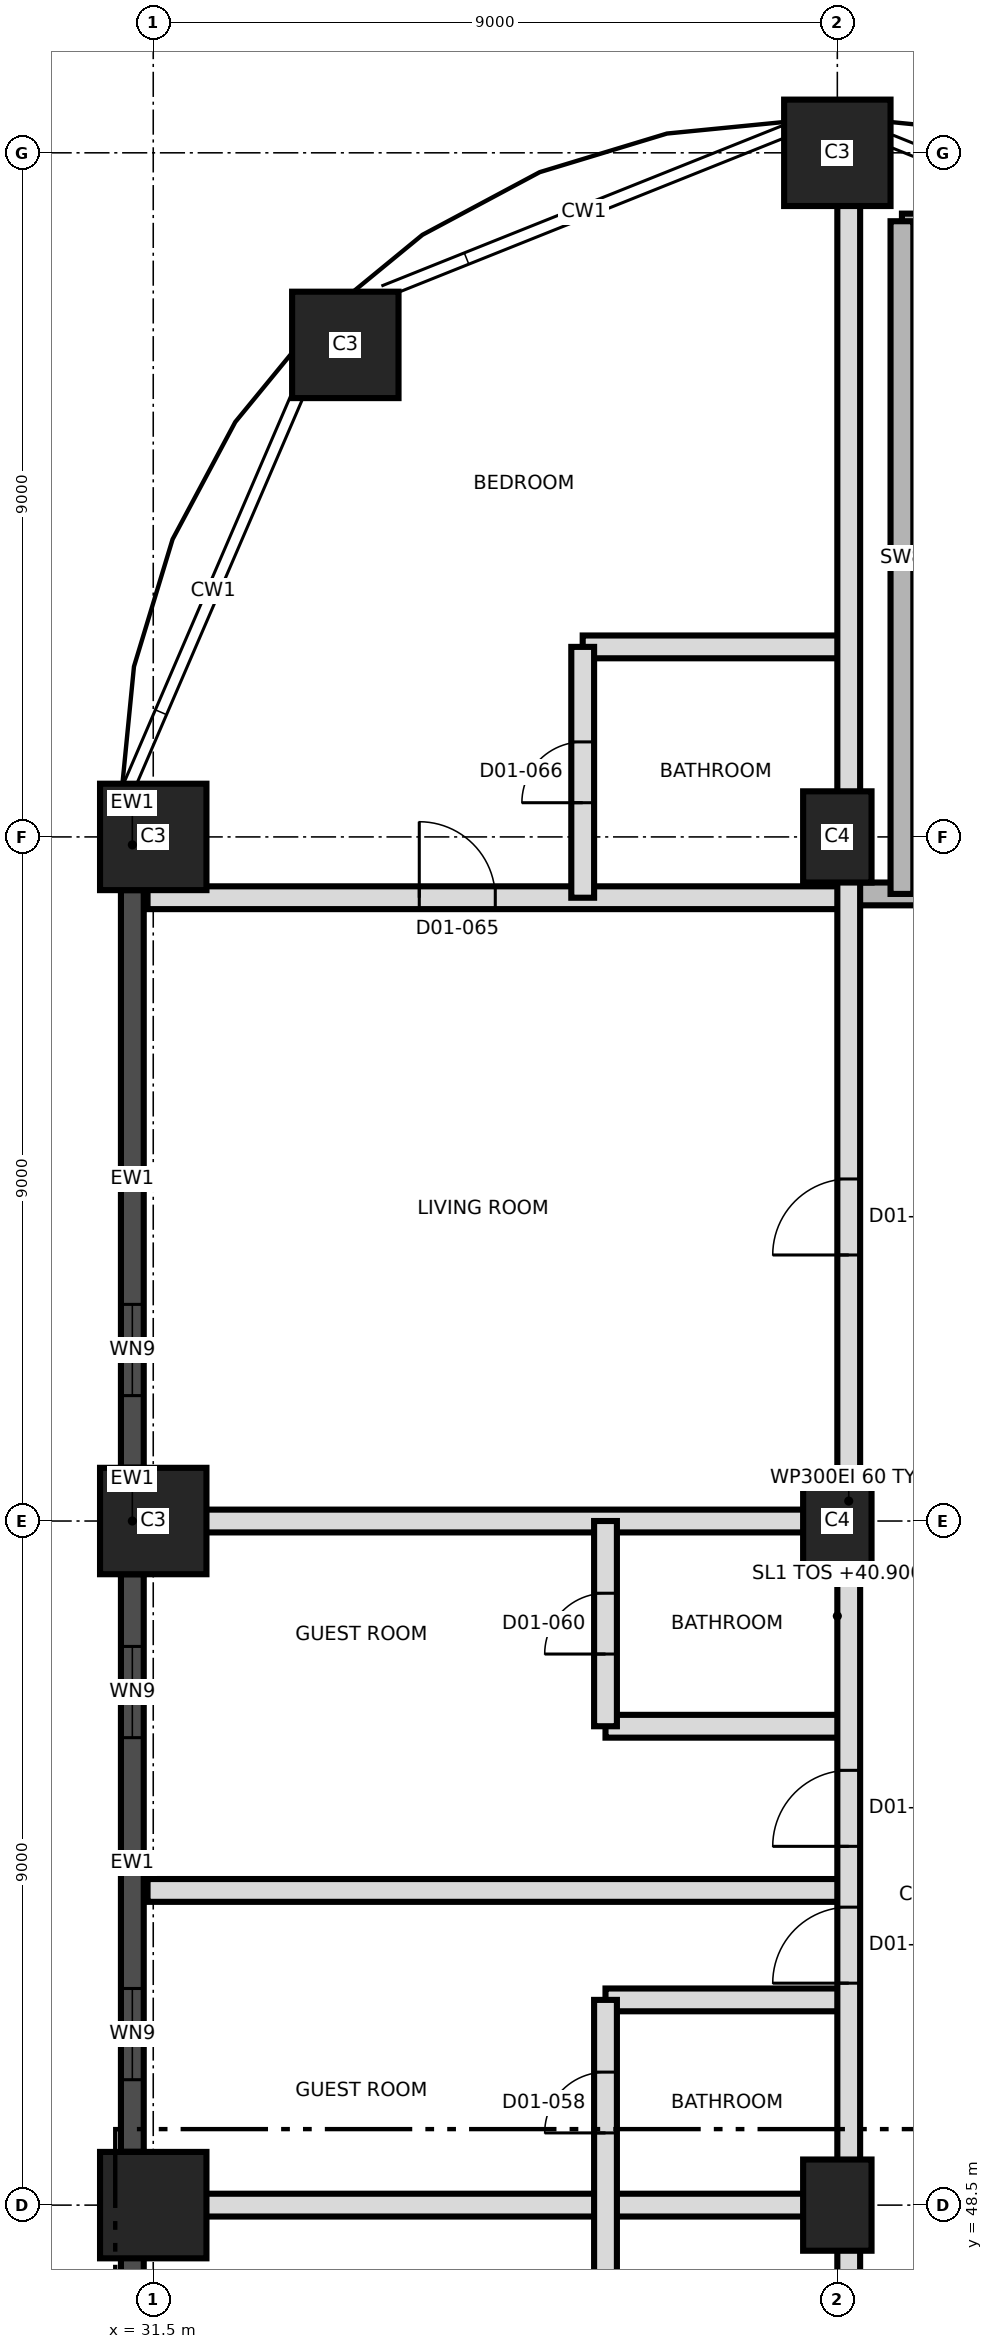
"""IFC4 building model, lengths in metres.
Left out: names, types, materials, properties, quantities, classifications, styles, units other than length and angle.
Written with IfcOpenShell. Run it as: python <this file> out.ifc"""

import sys

from ifc_helpers import new_model, si_unit, direction, frame, frame_2d, origin, origin_2d, place, context, subcontext, project, spatial, rectangle, extrude, element, fill, save


model = new_model("IFC4")
c1 = context("Model", 3, precision=1e-05, world=origin(), true_north=direction((0.0, 1.0)))
c2 = subcontext(c1, "Body", "Model", "MODEL_VIEW")
j1 = project(units=[si_unit("LENGTHUNIT", "METRE"), si_unit("PLANEANGLEUNIT", "RADIAN")], contexts=[c1])
p1 = place(None, origin())
s1 = spatial("IfcSite", under=j1, at=p1, CompositionType="ELEMENT")
p2 = place(p1, origin())
s2 = spatial("IfcBuilding", under=s1, at=p2, CompositionType="ELEMENT")
p3 = place(p2, frame((0.0, 0.0, 40.9)))
s3 = spatial("IfcBuildingStorey", under=s2, at=p3, CompositionType="ELEMENT", Elevation=40.9)
p4 = place(p3, frame((31.5, 48.5, 0.0), z_axis=(0.0, 0.0, 1.0), x_axis=(1.0, 0.0, 0.0)))
e1 = element("IfcColumn", 1, at=p4, inside=s3, PredefinedType="COLUMN", context=c2, shape_type="SweptSolid", body=[
    extrude(rectangle(XDim=1.4, YDim=1.4, at=origin_2d()), origin(), (0.0, 0.0, 1.0), 3.7),
])
p5 = place(p3, frame((40.5, 48.5, 0.0), z_axis=(0.0, 0.0, 1.0), x_axis=(0.0, 1.0, 0.0)))
e2 = element("IfcColumn", 2, at=p5, inside=s3, PredefinedType="COLUMN", context=c2, shape_type="SweptSolid", body=[
    extrude(rectangle(XDim=1.2, YDim=0.9, at=origin_2d()), origin(), (0.0, 0.0, 1.0), 3.7),
])
p6 = place(p3, frame((31.5, 57.5, 0.0), z_axis=(0.0, 0.0, 1.0), x_axis=(1.0, 0.0, 0.0)))
e3 = element("IfcColumn", 3, at=p6, inside=s3, PredefinedType="COLUMN", context=c2, shape_type="SweptSolid", body=[
    extrude(rectangle(XDim=1.4, YDim=1.4, at=origin_2d()), origin(), (0.0, 0.0, 1.0), 3.7),
])
p7 = place(p3, frame((40.5, 57.5, 0.0), z_axis=(0.0, 0.0, 1.0), x_axis=(0.0, 1.0, 0.0)))
e4 = element("IfcColumn", 4, at=p7, inside=s3, PredefinedType="COLUMN", context=c2, shape_type="SweptSolid", body=[
    extrude(rectangle(XDim=1.2, YDim=0.9, at=origin_2d()), origin(), (0.0, 0.0, 1.0), 3.7),
])
p8 = place(p3, frame((31.5, 66.5, 0.0), z_axis=(0.0, 0.0, 1.0), x_axis=(1.0, 0.0, 0.0)))
e5 = element("IfcColumn", 5, at=p8, inside=s3, PredefinedType="COLUMN", context=c2, shape_type="SweptSolid", body=[
    extrude(rectangle(XDim=1.4, YDim=1.4, at=origin_2d()), origin(), (0.0, 0.0, 1.0), 3.7),
])
p9 = place(p3, frame((40.5, 66.5, 0.0), z_axis=(0.0, 0.0, 1.0), x_axis=(0.0, 1.0, 0.0)))
e6 = element("IfcColumn", 6, at=p9, inside=s3, PredefinedType="COLUMN", context=c2, shape_type="SweptSolid", body=[
    extrude(rectangle(XDim=1.2, YDim=0.9, at=origin_2d()), origin(), (0.0, 0.0, 1.0), 3.7),
])
for number, where, z_axis, x_axis in (
    (7, (34.027, 72.973, 0.0), (0.0, 0.0, 1.0), (1.0, 0.0, 0.0)),
    (8, (40.5, 75.5, 0.0), (0.0, 0.0, 1.0), (1.0, 0.0, 0.0)),
):
    element("IfcColumn", number, at=place(p3, frame(where, z_axis=z_axis, x_axis=x_axis)), inside=s3, PredefinedType="COLUMN", context=c2, shape_type="SweptSolid", body=[
        extrude(rectangle(XDim=1.4, YDim=1.4, at=origin_2d()), origin(), (0.0, 0.0, 1.0), 3.7),
    ])
p10 = place(p3, frame((31.225, 66.992, 0.0), z_axis=(0.0, 0.0, 1.0), x_axis=(0.0, -1.0, 0.0)))
e9 = element("IfcWall", 9, at=p10, inside=s3, PredefinedType="SOLIDWALL", context=c2, shape_type="SweptSolid", body=[
    extrude(rectangle(XDim=1.192, YDim=0.3, at=frame_2d((0.596, 0.0))), origin(), (0.0, 0.0, 1.0), 3.4),
])
p11 = place(p3, frame((31.225, 65.8, 0.0), z_axis=(0.0, 0.0, 1.0), x_axis=(0.0, -1.0, 0.0)))
e10 = element("IfcWall", 10, at=p11, inside=s3, PredefinedType="SOLIDWALL", context=c2, shape_type="SweptSolid", body=[
    extrude(rectangle(XDim=7.6, YDim=0.3, at=frame_2d((3.8, 0.0))), origin(), (0.0, 0.0, 1.0), 2.7),
])
p12 = place(p11, frame((5.45, 0.0, 0.9)))
e11 = element("IfcOpeningElement", 11, at=p12, cuts=e10, PredefinedType="OPENING", context=c2, shape_type="SweptSolid", body=[
    extrude(rectangle(XDim=1.2, YDim=1.5, at=frame_2d((0.6, 0.75))), frame((0.0, 0.16, 0.0), z_axis=(0.0, -1.0, 0.0), x_axis=(1.0, 0.0, 0.0)), (0.0, 0.0, 1.0), 0.32),
])
p13 = place(p3, frame((31.225, 58.2, 0.0), z_axis=(0.0, 0.0, 1.0), x_axis=(0.0, -1.0, 0.0)))
e12 = element("IfcWall", 12, at=p13, inside=s3, PredefinedType="SOLIDWALL", context=c2, shape_type="SweptSolid", body=[
    extrude(rectangle(XDim=1.4, YDim=0.3, at=frame_2d((0.7, 0.0))), origin(), (0.0, 0.0, 1.0), 3.4),
])
p14 = place(p3, frame((31.225, 56.8, 0.0), z_axis=(0.0, 0.0, 1.0), x_axis=(0.0, -1.0, 0.0)))
e13 = element("IfcWall", 13, at=p14, inside=s3, PredefinedType="SOLIDWALL", context=c2, shape_type="SweptSolid", body=[
    extrude(rectangle(XDim=7.6, YDim=0.3, at=frame_2d((3.8, 0.0))), origin(), (0.0, 0.0, 1.0), 2.7),
])
p15 = place(p14, frame((0.95, 0.0, 0.9)))
e14 = element("IfcOpeningElement", 14, at=p15, cuts=e13, PredefinedType="OPENING", context=c2, shape_type="SweptSolid", body=[
    extrude(rectangle(XDim=1.2, YDim=1.5, at=frame_2d((0.6, 0.75))), frame((0.0, 0.16, 0.0), z_axis=(0.0, -1.0, 0.0), x_axis=(1.0, 0.0, 0.0)), (0.0, 0.0, 1.0), 0.32),
])
p16 = place(p14, frame((5.45, 0.0, 0.9)))
e15 = element("IfcOpeningElement", 15, at=p16, cuts=e13, PredefinedType="OPENING", context=c2, shape_type="SweptSolid", body=[
    extrude(rectangle(XDim=1.2, YDim=1.5, at=frame_2d((0.6, 0.75))), frame((0.0, 0.16, 0.0), z_axis=(0.0, -1.0, 0.0), x_axis=(1.0, 0.0, 0.0)), (0.0, 0.0, 1.0), 0.32),
])
p17 = place(p3, frame((31.225, 49.2, 0.0), z_axis=(0.0, 0.0, 1.0), x_axis=(0.0, -1.0, 0.0)))
e16 = element("IfcWall", 16, at=p17, inside=s3, PredefinedType="SOLIDWALL", context=c2, shape_type="SweptSolid", body=[
    extrude(rectangle(XDim=9.02, YDim=0.3, at=frame_2d((4.51, 0.0))), origin(), (0.0, 0.0, 1.0), 3.4),
])
p18 = place(p17, frame((2.35, 0.0, 0.9)))
e17 = element("IfcOpeningElement", 17, at=p18, cuts=e16, PredefinedType="OPENING", context=c2, shape_type="SweptSolid", body=[
    extrude(rectangle(XDim=1.2, YDim=1.5, at=frame_2d((0.6, 0.75))), frame((0.0, 0.16, 0.0), z_axis=(0.0, -1.0, 0.0), x_axis=(1.0, 0.0, 0.0)), (0.0, 0.0, 1.0), 0.32),
])
p19 = place(p17, frame((6.21, 0.0, 0.3)))
e18 = element("IfcOpeningElement", 18, at=p19, cuts=e16, PredefinedType="OPENING", context=c2, shape_type="SweptSolid", body=[
    extrude(rectangle(XDim=1.8, YDim=2.4, at=frame_2d((0.9, 1.2))), frame((0.0, 0.16, 0.0), z_axis=(0.0, -1.0, 0.0), x_axis=(1.0, 0.0, 0.0)), (0.0, 0.0, 1.0), 0.32),
])
p20 = place(p3, frame((31.425, 48.5, 0.0), z_axis=(0.0, 0.0, 1.0), x_axis=(1.0, 0.0, 0.0)))
e19 = element("IfcWall", 19, at=p20, inside=s3, PredefinedType="PARTITIONING", context=c2, shape_type="SweptSolid", body=[
    extrude(rectangle(XDim=9.225, YDim=0.3, at=frame_2d((4.612, 0.0))), origin(), (0.0, 0.0, 1.0), 3.4),
])
p21 = place(p3, frame((37.45, 51.2, 0.0), z_axis=(0.0, 0.0, 1.0), x_axis=(1.0, 0.0, 0.0)))
e20 = element("IfcWall", 20, at=p21, inside=s3, PredefinedType="PARTITIONING", context=c2, shape_type="SweptSolid", body=[
    extrude(rectangle(XDim=3.2, YDim=0.3, at=frame_2d((1.6, 0.0))), origin(), (0.0, 0.0, 1.0), 3.4),
])
p22 = place(p3, frame((31.425, 52.64, 0.0), z_axis=(0.0, 0.0, 1.0), x_axis=(1.0, 0.0, 0.0)))
e21 = element("IfcWall", 21, at=p22, inside=s3, PredefinedType="PARTITIONING", context=c2, shape_type="SweptSolid", body=[
    extrude(rectangle(XDim=9.225, YDim=0.3, at=frame_2d((4.612, 0.0))), origin(), (0.0, 0.0, 1.0), 3.4),
])
p23 = place(p3, frame((37.45, 54.8, 0.0), z_axis=(0.0, 0.0, 1.0), x_axis=(1.0, 0.0, 0.0)))
e22 = element("IfcWall", 22, at=p23, inside=s3, PredefinedType="PARTITIONING", context=c2, shape_type="SweptSolid", body=[
    extrude(rectangle(XDim=3.2, YDim=0.3, at=frame_2d((1.6, 0.0))), origin(), (0.0, 0.0, 1.0), 3.4),
])
p24 = place(p3, frame((31.425, 57.5, 0.0), z_axis=(0.0, 0.0, 1.0), x_axis=(1.0, 0.0, 0.0)))
e23 = element("IfcWall", 23, at=p24, inside=s3, PredefinedType="PARTITIONING", context=c2, shape_type="SweptSolid", body=[
    extrude(rectangle(XDim=9.225, YDim=0.3, at=frame_2d((4.612, 0.0))), origin(), (0.0, 0.0, 1.0), 3.4),
])
p25 = place(p3, frame((31.425, 65.7, 0.0), z_axis=(0.0, 0.0, 1.0), x_axis=(1.0, 0.0, 0.0)))
e24 = element("IfcWall", 24, at=p25, inside=s3, PredefinedType="PARTITIONING", context=c2, shape_type="SweptSolid", body=[
    extrude(rectangle(XDim=9.225, YDim=0.3, at=frame_2d((4.612, 0.0))), origin(), (0.0, 0.0, 1.0), 3.4),
])
p26 = place(p25, frame((3.575, 0.0, 0.0)))
e25 = element("IfcOpeningElement", 25, at=p26, cuts=e24, PredefinedType="OPENING", context=c2, shape_type="SweptSolid", body=[
    extrude(rectangle(XDim=1.0, YDim=2.1, at=frame_2d((0.5, 1.05))), frame((0.0, 0.16, 0.0), z_axis=(0.0, -1.0, 0.0), x_axis=(1.0, 0.0, 0.0)), (0.0, 0.0, 1.0), 0.32),
])
p27 = place(p3, frame((40.65, 65.75, 0.0), z_axis=(0.0, 0.0, 1.0), x_axis=(1.0, 0.0, 0.0)))
e26 = element("IfcWall", 26, at=p27, inside=s3, PredefinedType="SHEAR", context=c2, shape_type="SweptSolid", body=[
    extrude(rectangle(XDim=3.7, YDim=0.3, at=frame_2d((1.85, 0.0))), origin(), (0.0, 0.0, 1.0), 3.4),
])
p28 = place(p27, frame((1.1, 0.0, 0.0)))
e27 = element("IfcOpeningElement", 27, at=p28, cuts=e26, PredefinedType="OPENING", context=c2, shape_type="SweptSolid", body=[
    extrude(rectangle(XDim=1.2, YDim=2.1, at=frame_2d((0.6, 1.05))), frame((0.0, 0.16, 0.0), z_axis=(0.0, -1.0, 0.0), x_axis=(1.0, 0.0, 0.0)), (0.0, 0.0, 1.0), 0.32),
])
p29 = place(p3, frame((37.15, 69.0, 0.0), z_axis=(0.0, 0.0, 1.0), x_axis=(1.0, 0.0, 0.0)))
e28 = element("IfcWall", 28, at=p29, inside=s3, PredefinedType="PARTITIONING", context=c2, shape_type="SweptSolid", body=[
    extrude(rectangle(XDim=3.5, YDim=0.3, at=frame_2d((1.75, 0.0))), origin(), (0.0, 0.0, 1.0), 3.4),
])
p30 = place(p3, frame((41.35, 74.55, 0.0), z_axis=(0.0, 0.0, 1.0), x_axis=(1.0, 0.0, 0.0)))
e29 = element("IfcWall", 29, at=p30, inside=s3, PredefinedType="SHEAR", context=c2, shape_type="SweptSolid", body=[
    extrude(rectangle(XDim=3.0, YDim=0.3, at=frame_2d((1.5, 0.0))), origin(), (0.0, 0.0, 1.0), 3.4),
])
p31 = place(p3, frame((37.15, 65.7, 0.0), z_axis=(0.0, 0.0, 1.0), x_axis=(0.0, 1.0, 0.0)))
e30 = element("IfcWall", 30, at=p31, inside=s3, PredefinedType="PARTITIONING", context=c2, shape_type="SweptSolid", body=[
    extrude(rectangle(XDim=3.3, YDim=0.3, at=frame_2d((1.65, 0.0))), origin(), (0.0, 0.0, 1.0), 3.4),
])
p32 = place(p31, frame((1.25, 0.0, 0.0)))
e31 = element("IfcOpeningElement", 31, at=p32, cuts=e30, PredefinedType="OPENING", context=c2, shape_type="SweptSolid", body=[
    extrude(rectangle(XDim=0.8, YDim=2.1, at=frame_2d((0.4, 1.05))), frame((0.0, 0.16, 0.0), z_axis=(0.0, -1.0, 0.0), x_axis=(1.0, 0.0, 0.0)), (0.0, 0.0, 1.0), 0.32),
])
p33 = place(p3, frame((37.45, 45.8, 0.0), z_axis=(0.0, 0.0, 1.0), x_axis=(0.0, 1.0, 0.0)))
e32 = element("IfcWall", 32, at=p33, inside=s3, PredefinedType="PARTITIONING", context=c2, shape_type="SweptSolid", body=[
    extrude(rectangle(XDim=5.4, YDim=0.3, at=frame_2d((2.7, 0.0))), origin(), (0.0, 0.0, 1.0), 3.4),
])
p34 = place(p33, frame((0.95, 0.0, 0.0)))
e33 = element("IfcOpeningElement", 33, at=p34, cuts=e32, PredefinedType="OPENING", context=c2, shape_type="SweptSolid", body=[
    extrude(rectangle(XDim=0.8, YDim=2.1, at=frame_2d((0.4, 1.05))), frame((0.0, 0.16, 0.0), z_axis=(0.0, -1.0, 0.0), x_axis=(1.0, 0.0, 0.0)), (0.0, 0.0, 1.0), 0.32),
])
p35 = place(p33, frame((3.65, 0.0, 0.0)))
e34 = element("IfcOpeningElement", 34, at=p35, cuts=e32, PredefinedType="OPENING", context=c2, shape_type="SweptSolid", body=[
    extrude(rectangle(XDim=0.8, YDim=2.1, at=frame_2d((0.4, 1.05))), frame((0.0, 0.16, 0.0), z_axis=(0.0, -1.0, 0.0), x_axis=(1.0, 0.0, 0.0)), (0.0, 0.0, 1.0), 0.32),
])
p36 = place(p3, frame((37.45, 54.8, 0.0), z_axis=(0.0, 0.0, 1.0), x_axis=(0.0, 1.0, 0.0)))
e35 = element("IfcWall", 35, at=p36, inside=s3, PredefinedType="PARTITIONING", context=c2, shape_type="SweptSolid", body=[
    extrude(rectangle(XDim=2.7, YDim=0.3, at=frame_2d((1.35, 0.0))), origin(), (0.0, 0.0, 1.0), 3.4),
])
p37 = place(p36, frame((0.95, 0.0, 0.0)))
e36 = element("IfcOpeningElement", 36, at=p37, cuts=e35, PredefinedType="OPENING", context=c2, shape_type="SweptSolid", body=[
    extrude(rectangle(XDim=0.8, YDim=2.1, at=frame_2d((0.4, 1.05))), frame((0.0, 0.16, 0.0), z_axis=(0.0, -1.0, 0.0), x_axis=(1.0, 0.0, 0.0)), (0.0, 0.0, 1.0), 0.32),
])
p38 = place(p3, frame((40.65, 39.95, 0.0), z_axis=(0.0, 0.0, 1.0), x_axis=(0.0, 1.0, 0.0)))
e37 = element("IfcWall", 37, at=p38, inside=s3, PredefinedType="PARTITIONING", context=c2, shape_type="SweptSolid", body=[
    extrude(rectangle(XDim=35.625, YDim=0.3, at=frame_2d((17.812, 0.0))), origin(), (0.0, 0.0, 1.0), 3.4),
])
p39 = place(p38, frame((2.83, 0.0, 0.0)))
e38 = element("IfcOpeningElement", 38, at=p39, cuts=e37, PredefinedType="OPENING", context=c2, shape_type="SweptSolid", body=[
    extrude(rectangle(XDim=1.0, YDim=2.1, at=frame_2d((0.5, 1.05))), frame((0.0, 0.16, 0.0), z_axis=(0.0, -1.0, 0.0), x_axis=(1.0, 0.0, 0.0)), (0.0, 0.0, 1.0), 0.32),
])
p40 = place(p38, frame((4.63, 0.0, 0.0)))
e39 = element("IfcOpeningElement", 39, at=p40, cuts=e37, PredefinedType="OPENING", context=c2, shape_type="SweptSolid", body=[
    extrude(rectangle(XDim=1.0, YDim=2.1, at=frame_2d((0.5, 1.05))), frame((0.0, 0.16, 0.0), z_axis=(0.0, -1.0, 0.0), x_axis=(1.0, 0.0, 0.0)), (0.0, 0.0, 1.0), 0.32),
])
p41 = place(p38, frame((11.47, 0.0, 0.0)))
e40 = element("IfcOpeningElement", 40, at=p41, cuts=e37, PredefinedType="OPENING", context=c2, shape_type="SweptSolid", body=[
    extrude(rectangle(XDim=1.0, YDim=2.1, at=frame_2d((0.5, 1.05))), frame((0.0, 0.16, 0.0), z_axis=(0.0, -1.0, 0.0), x_axis=(1.0, 0.0, 0.0)), (0.0, 0.0, 1.0), 0.32),
])
p42 = place(p38, frame((13.27, 0.0, 0.0)))
e41 = element("IfcOpeningElement", 41, at=p42, cuts=e37, PredefinedType="OPENING", context=c2, shape_type="SweptSolid", body=[
    extrude(rectangle(XDim=1.0, YDim=2.1, at=frame_2d((0.5, 1.05))), frame((0.0, 0.16, 0.0), z_axis=(0.0, -1.0, 0.0), x_axis=(1.0, 0.0, 0.0)), (0.0, 0.0, 1.0), 0.32),
])
p43 = place(p38, frame((21.05, 0.0, 0.0)))
e42 = element("IfcOpeningElement", 42, at=p43, cuts=e37, PredefinedType="OPENING", context=c2, shape_type="SweptSolid", body=[
    extrude(rectangle(XDim=1.0, YDim=2.4, at=frame_2d((0.5, 1.2))), frame((0.0, 0.16, 0.0), z_axis=(0.0, -1.0, 0.0), x_axis=(1.0, 0.0, 0.0)), (0.0, 0.0, 1.0), 0.32),
])
p44 = place(p3, frame((41.35, 65.75, 0.0), z_axis=(0.0, 0.0, 1.0), x_axis=(0.0, 1.0, 0.0)))
e43 = element("IfcWall", 43, at=p44, inside=s3, PredefinedType="SHEAR", context=c2, shape_type="SweptSolid", body=[
    extrude(rectangle(XDim=8.85, YDim=0.3, at=frame_2d((4.425, 0.0))), origin(), (0.0, 0.0, 1.0), 3.4),
])
p45 = place(p12, origin())
e44 = element("IfcWindow", 44, at=p45, inside=s3, PartitioningType="SINGLE_PANEL", PredefinedType="WINDOW", context=c2, shape_type="SweptSolid", body=[
    extrude(rectangle(XDim=1.2, YDim=1.5, at=frame_2d((0.6, 0.75))), frame((0.0, 0.03, 0.0), z_axis=(0.0, -1.0, 0.0), x_axis=(1.0, 0.0, 0.0)), (0.0, 0.0, 1.0), 0.06),
])
fill(e11, e44)
p46 = place(p15, origin())
e45 = element("IfcWindow", 45, at=p46, inside=s3, PartitioningType="SINGLE_PANEL", PredefinedType="WINDOW", context=c2, shape_type="SweptSolid", body=[
    extrude(rectangle(XDim=1.2, YDim=1.5, at=frame_2d((0.6, 0.75))), frame((0.0, 0.03, 0.0), z_axis=(0.0, -1.0, 0.0), x_axis=(1.0, 0.0, 0.0)), (0.0, 0.0, 1.0), 0.06),
])
fill(e14, e45)
p47 = place(p16, origin())
e46 = element("IfcWindow", 46, at=p47, inside=s3, PartitioningType="SINGLE_PANEL", PredefinedType="WINDOW", context=c2, shape_type="SweptSolid", body=[
    extrude(rectangle(XDim=1.2, YDim=1.5, at=frame_2d((0.6, 0.75))), frame((0.0, 0.03, 0.0), z_axis=(0.0, -1.0, 0.0), x_axis=(1.0, 0.0, 0.0)), (0.0, 0.0, 1.0), 0.06),
])
fill(e15, e46)
p48 = place(p35, origin())
e47 = element("IfcDoor", 47, at=p48, inside=s3, OperationType="SINGLE_SWING_RIGHT", PredefinedType="DOOR", context=c2, shape_type="SweptSolid", body=[
    extrude(rectangle(XDim=0.8, YDim=2.1, at=frame_2d((0.4, 1.05))), frame((0.0, 0.025, 0.0), z_axis=(0.0, -1.0, 0.0), x_axis=(1.0, 0.0, 0.0)), (0.0, 0.0, 1.0), 0.05),
])
fill(e34, e47)
p49 = place(p41, origin())
e48 = element("IfcDoor", 48, at=p49, inside=s3, OperationType="SINGLE_SWING_LEFT", PredefinedType="DOOR", context=c2, shape_type="SweptSolid", body=[
    extrude(rectangle(XDim=1.0, YDim=2.1, at=frame_2d((0.5, 1.05))), frame((0.0, 0.025, 0.0), z_axis=(0.0, -1.0, 0.0), x_axis=(1.0, 0.0, 0.0)), (0.0, 0.0, 1.0), 0.05),
])
fill(e40, e48)
p50 = place(p37, origin())
e49 = element("IfcDoor", 49, at=p50, inside=s3, OperationType="SINGLE_SWING_LEFT", PredefinedType="DOOR", context=c2, shape_type="SweptSolid", body=[
    extrude(rectangle(XDim=0.8, YDim=2.1, at=frame_2d((0.4, 1.05))), frame((0.0, 0.025, 0.0), z_axis=(0.0, -1.0, 0.0), x_axis=(1.0, 0.0, 0.0)), (0.0, 0.0, 1.0), 0.05),
])
fill(e36, e49)
p51 = place(p42, origin())
e50 = element("IfcDoor", 50, at=p51, inside=s3, OperationType="SINGLE_SWING_LEFT", PredefinedType="DOOR", context=c2, shape_type="SweptSolid", body=[
    extrude(rectangle(XDim=1.0, YDim=2.1, at=frame_2d((0.5, 1.05))), frame((0.0, 0.025, 0.0), z_axis=(0.0, -1.0, 0.0), x_axis=(1.0, 0.0, 0.0)), (0.0, 0.0, 1.0), 0.05),
])
fill(e41, e50)
p52 = place(p43, origin())
e51 = element("IfcDoor", 51, at=p52, inside=s3, OperationType="SINGLE_SWING_LEFT", PredefinedType="DOOR", context=c2, shape_type="SweptSolid", body=[
    extrude(rectangle(XDim=1.0, YDim=2.4, at=frame_2d((0.5, 1.2))), frame((0.0, 0.025, 0.0), z_axis=(0.0, -1.0, 0.0), x_axis=(1.0, 0.0, 0.0)), (0.0, 0.0, 1.0), 0.05),
])
fill(e42, e51)
p53 = place(p26, origin())
e52 = element("IfcDoor", 52, at=p53, inside=s3, OperationType="SINGLE_SWING_RIGHT", PredefinedType="DOOR", context=c2, shape_type="SweptSolid", body=[
    extrude(rectangle(XDim=1.0, YDim=2.1, at=frame_2d((0.5, 1.05))), frame((0.0, 0.025, 0.0), z_axis=(0.0, -1.0, 0.0), x_axis=(1.0, 0.0, 0.0)), (0.0, 0.0, 1.0), 0.05),
])
fill(e25, e52)
p54 = place(p32, origin())
e53 = element("IfcDoor", 53, at=p54, inside=s3, OperationType="SINGLE_SWING_LEFT", PredefinedType="DOOR", context=c2, shape_type="SweptSolid", body=[
    extrude(rectangle(XDim=0.8, YDim=2.1, at=frame_2d((0.4, 1.05))), frame((0.0, 0.025, 0.0), z_axis=(0.0, -1.0, 0.0), x_axis=(1.0, 0.0, 0.0)), (0.0, 0.0, 1.0), 0.05),
])
fill(e31, e53)
save(model, sys.argv[1])
